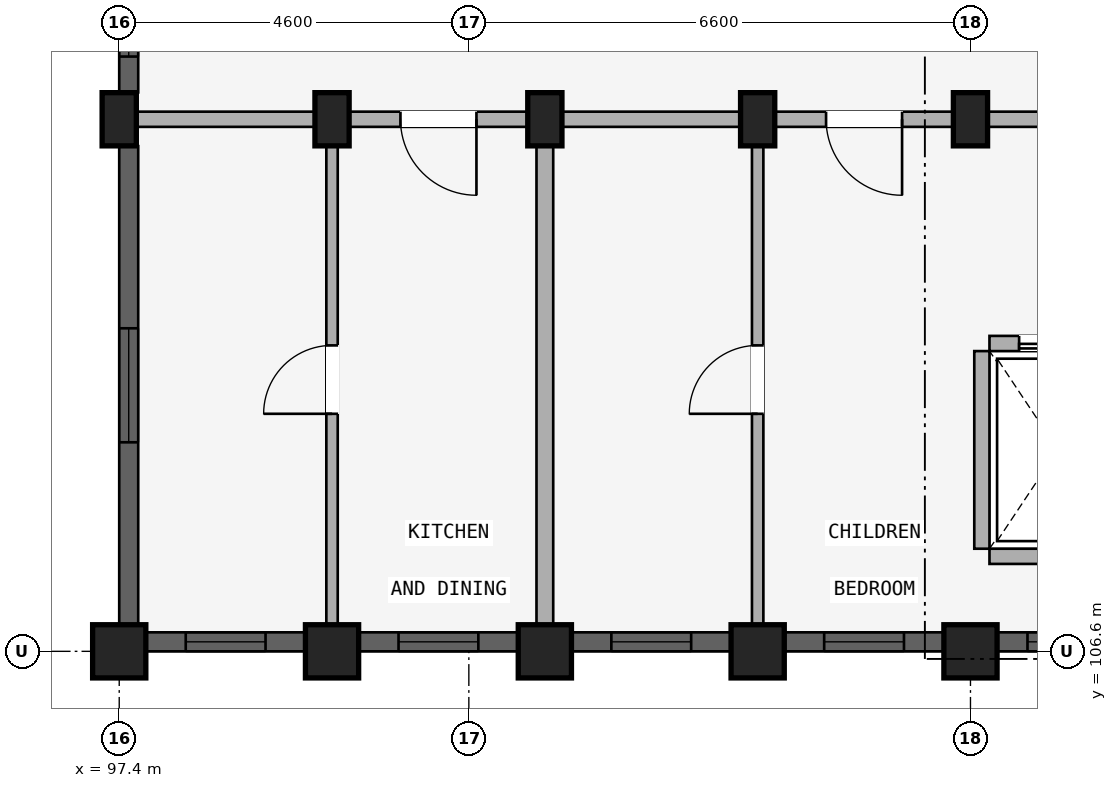
"""IFC4 building model, lengths in metres.
Left out: names, types, materials, properties, quantities, classifications, styles, units other than length and angle.
Written with IfcOpenShell. Run it as: python <this file> out.ifc"""

import sys

from ifc_helpers import new_model, si_unit, direction, frame, frame_2d, origin, origin_2d, place, context, subcontext, project, spatial, rectangle, extrude, element, fill, save


model = new_model("IFC4")
c1 = context("Model", 3, precision=1e-05, world=origin(), true_north=direction((0.0, 1.0)))
c2 = subcontext(c1, "Body", "Model", "MODEL_VIEW")
j1 = project(units=[si_unit("LENGTHUNIT", "METRE"), si_unit("PLANEANGLEUNIT", "RADIAN")], contexts=[c1])
p1 = place(None, origin())
s1 = spatial("IfcSite", under=j1, at=p1, CompositionType="ELEMENT")
p2 = place(p1, origin())
s2 = spatial("IfcBuilding", under=s1, at=p2, CompositionType="ELEMENT")
p3 = place(p2, frame((0.0, 0.0, 21.3)))
s3 = spatial("IfcBuildingStorey", under=s2, at=p3, CompositionType="ELEMENT", Elevation=21.3)
p4 = place(p3, frame((108.6, 106.6, 0.0), z_axis=(0.0, 0.0, 1.0), x_axis=(1.0, 0.0, 0.0)))
e1 = element("IfcColumn", 1, at=p4, inside=s3, PredefinedType="COLUMN", context=c2, shape_type="SweptSolid", body=[
    extrude(rectangle(XDim=0.7, YDim=0.7, at=origin_2d()), origin(), (0.0, 0.0, 1.0), 2.93),
])
p5 = place(p3, frame((108.6, 113.6, 0.0), z_axis=(0.0, 0.0, 1.0), x_axis=(1.0, 0.0, 0.0)))
e2 = element("IfcColumn", 2, at=p5, inside=s3, PredefinedType="COLUMN", context=c2, shape_type="SweptSolid", body=[
    extrude(rectangle(XDim=0.45, YDim=0.7, at=origin_2d()), origin(), (0.0, 0.0, 1.0), 2.93),
])
p6 = place(p3, frame((105.8, 106.6, 0.0), z_axis=(0.0, 0.0, 1.0), x_axis=(1.0, 0.0, 0.0)))
e3 = element("IfcColumn", 3, at=p6, inside=s3, PredefinedType="COLUMN", context=c2, shape_type="SweptSolid", body=[
    extrude(rectangle(XDim=0.7, YDim=0.7, at=origin_2d()), origin(), (0.0, 0.0, 1.0), 2.93),
])
p7 = place(p3, frame((105.8, 113.6, 0.0), z_axis=(0.0, 0.0, 1.0), x_axis=(1.0, 0.0, 0.0)))
e4 = element("IfcColumn", 4, at=p7, inside=s3, PredefinedType="COLUMN", context=c2, shape_type="SweptSolid", body=[
    extrude(rectangle(XDim=0.45, YDim=0.7, at=origin_2d()), origin(), (0.0, 0.0, 1.0), 2.93),
])
p8 = place(p3, frame((103.0, 106.6, 0.0), z_axis=(0.0, 0.0, 1.0), x_axis=(1.0, 0.0, 0.0)))
e5 = element("IfcColumn", 5, at=p8, inside=s3, PredefinedType="COLUMN", context=c2, shape_type="SweptSolid", body=[
    extrude(rectangle(XDim=0.7, YDim=0.7, at=origin_2d()), origin(), (0.0, 0.0, 1.0), 2.93),
])
p9 = place(p3, frame((103.0, 113.6, 0.0), z_axis=(0.0, 0.0, 1.0), x_axis=(1.0, 0.0, 0.0)))
e6 = element("IfcColumn", 6, at=p9, inside=s3, PredefinedType="COLUMN", context=c2, shape_type="SweptSolid", body=[
    extrude(rectangle(XDim=0.45, YDim=0.7, at=origin_2d()), origin(), (0.0, 0.0, 1.0), 2.93),
])
p10 = place(p3, frame((100.2, 106.6, 0.0), z_axis=(0.0, 0.0, 1.0), x_axis=(1.0, 0.0, 0.0)))
e7 = element("IfcColumn", 7, at=p10, inside=s3, PredefinedType="COLUMN", context=c2, shape_type="SweptSolid", body=[
    extrude(rectangle(XDim=0.7, YDim=0.7, at=origin_2d()), origin(), (0.0, 0.0, 1.0), 2.93),
])
p11 = place(p3, frame((100.2, 113.6, 0.0), z_axis=(0.0, 0.0, 1.0), x_axis=(1.0, 0.0, 0.0)))
e8 = element("IfcColumn", 8, at=p11, inside=s3, PredefinedType="COLUMN", context=c2, shape_type="SweptSolid", body=[
    extrude(rectangle(XDim=0.45, YDim=0.7, at=origin_2d()), origin(), (0.0, 0.0, 1.0), 2.93),
])
p12 = place(p3, frame((97.4, 106.6, 0.0), z_axis=(0.0, 0.0, 1.0), x_axis=(1.0, 0.0, 0.0)))
e9 = element("IfcColumn", 9, at=p12, inside=s3, PredefinedType="COLUMN", context=c2, shape_type="SweptSolid", body=[
    extrude(rectangle(XDim=0.7, YDim=0.7, at=origin_2d()), origin(), (0.0, 0.0, 1.0), 2.93),
])
p13 = place(p3, frame((97.4, 113.6, 0.0), z_axis=(0.0, 0.0, 1.0), x_axis=(1.0, 0.0, 0.0)))
e10 = element("IfcColumn", 10, at=p13, inside=s3, PredefinedType="COLUMN", context=c2, shape_type="SweptSolid", body=[
    extrude(rectangle(XDim=0.45, YDim=0.7, at=origin_2d()), origin(), (0.0, 0.0, 1.0), 2.93),
])
p14 = place(p3, frame((108.75, 107.95, 0.0), z_axis=(0.0, 0.0, 1.0), x_axis=(0.0, 1.0, 0.0)))
e11 = element("IfcWall", 11, at=p14, inside=s3, PredefinedType="STANDARD", context=c2, shape_type="SweptSolid", body=[
    extrude(rectangle(XDim=2.6, YDim=0.2, at=frame_2d((1.3, 0.0))), origin(), (0.0, 0.0, 1.0), 2.372),
])
p15 = place(p3, frame((110.65, 107.85, 0.0), z_axis=(0.0, 0.0, 1.0), x_axis=(-1.0, 0.0, 0.0)))
e12 = element("IfcWall", 12, at=p15, inside=s3, PredefinedType="STANDARD", context=c2, shape_type="SweptSolid", body=[
    extrude(rectangle(XDim=1.8, YDim=0.2, at=frame_2d((0.9, 0.0))), origin(), (0.0, 0.0, 1.0), 2.93),
])
p16 = place(p3, frame((110.65, 110.65, 0.0), z_axis=(0.0, 0.0, 1.0), x_axis=(-1.0, 0.0, 0.0)))
e13 = element("IfcWall", 13, at=p16, inside=s3, PredefinedType="STANDARD", context=c2, shape_type="SweptSolid", body=[
    extrude(rectangle(XDim=1.8, YDim=0.2, at=frame_2d((0.9, 0.0))), origin(), (0.0, 0.0, 1.0), 2.93),
])
p17 = place(p16, frame((0.39, 0.0, 0.0)))
e14 = element("IfcOpeningElement", 14, at=p17, cuts=e13, PredefinedType="OPENING", context=c2, shape_type="SweptSolid", body=[
    extrude(rectangle(XDim=1.02, YDim=2.15, at=frame_2d((0.51, 1.075))), frame((0.0, 0.11, 0.0), z_axis=(0.0, -1.0, 0.0), x_axis=(1.0, 0.0, 0.0)), (0.0, 0.0, 1.0), 0.22),
])
p18 = place(p3, frame((114.25, 113.6, 0.0), z_axis=(0.0, 0.0, 1.0), x_axis=(-1.0, 0.0, 0.0)))
e15 = element("IfcWall", 15, at=p18, inside=s3, PredefinedType="STANDARD", context=c2, shape_type="SweptSolid", body=[
    extrude(rectangle(XDim=5.6, YDim=0.2, at=frame_2d((2.8, 0.0))), origin(), (0.0, 0.0, 1.0), 2.372),
])
p19 = place(p18, frame((1.91, 0.0, 0.0)))
e16 = element("IfcOpeningElement", 16, at=p19, cuts=e15, PredefinedType="OPENING", context=c2, shape_type="SweptSolid", body=[
    extrude(rectangle(XDim=1.22, YDim=2.15, at=frame_2d((0.61, 1.075))), frame((0.0, 0.11, 0.0), z_axis=(0.0, -1.0, 0.0), x_axis=(1.0, 0.0, 0.0)), (0.0, 0.0, 1.0), 0.22),
])
p20 = place(p3, frame((108.6, 113.6, 0.0), z_axis=(0.0, 0.0, 1.0), x_axis=(-1.0, 0.0, 0.0)))
e17 = element("IfcWall", 17, at=p20, inside=s3, PredefinedType="STANDARD", context=c2, shape_type="SweptSolid", body=[
    extrude(rectangle(XDim=2.8, YDim=0.2, at=frame_2d((1.4, 0.0))), origin(), (0.0, 0.0, 1.0), 2.372),
])
p21 = place(p20, frame((0.9, 0.0, 0.0)))
e18 = element("IfcOpeningElement", 18, at=p21, cuts=e17, PredefinedType="OPENING", context=c2, shape_type="SweptSolid", body=[
    extrude(rectangle(XDim=1.0, YDim=2.15, at=frame_2d((0.5, 1.075))), frame((0.0, 0.11, 0.0), z_axis=(0.0, -1.0, 0.0), x_axis=(1.0, 0.0, 0.0)), (0.0, 0.0, 1.0), 0.22),
])
p22 = place(p3, frame((105.8, 113.6, 0.0), z_axis=(0.0, 0.0, 1.0), x_axis=(-1.0, 0.0, 0.0)))
e19 = element("IfcWall", 19, at=p22, inside=s3, PredefinedType="STANDARD", context=c2, shape_type="SweptSolid", body=[
    extrude(rectangle(XDim=2.8, YDim=0.2, at=frame_2d((1.4, 0.0))), origin(), (0.0, 0.0, 1.0), 2.372),
])
p23 = place(p3, frame((103.0, 113.6, 0.0), z_axis=(0.0, 0.0, 1.0), x_axis=(-1.0, 0.0, 0.0)))
e20 = element("IfcWall", 20, at=p23, inside=s3, PredefinedType="STANDARD", context=c2, shape_type="SweptSolid", body=[
    extrude(rectangle(XDim=2.8, YDim=0.2, at=frame_2d((1.4, 0.0))), origin(), (0.0, 0.0, 1.0), 2.372),
])
p24 = place(p23, frame((0.9, 0.0, 0.0)))
e21 = element("IfcOpeningElement", 21, at=p24, cuts=e20, PredefinedType="OPENING", context=c2, shape_type="SweptSolid", body=[
    extrude(rectangle(XDim=1.0, YDim=2.15, at=frame_2d((0.5, 1.075))), frame((0.0, 0.11, 0.0), z_axis=(0.0, -1.0, 0.0), x_axis=(1.0, 0.0, 0.0)), (0.0, 0.0, 1.0), 0.22),
])
p25 = place(p3, frame((100.2, 113.6, 0.0), z_axis=(0.0, 0.0, 1.0), x_axis=(-1.0, 0.0, 0.0)))
e22 = element("IfcWall", 22, at=p25, inside=s3, PredefinedType="STANDARD", context=c2, shape_type="SweptSolid", body=[
    extrude(rectangle(XDim=2.8, YDim=0.2, at=frame_2d((1.4, 0.0))), origin(), (0.0, 0.0, 1.0), 2.372),
])
p26 = place(p3, frame((105.8, 106.8, 0.0), z_axis=(0.0, 0.0, 1.0), x_axis=(0.0, 1.0, 0.0)))
e23 = element("IfcWall", 23, at=p26, inside=s3, PredefinedType="PARTITIONING", context=c2, shape_type="SweptSolid", body=[
    extrude(rectangle(XDim=6.75, YDim=0.15, at=frame_2d((3.375, 0.0))), origin(), (0.0, 0.0, 1.0), 2.372),
])
p27 = place(p26, frame((2.925, 0.0, 0.0)))
e24 = element("IfcOpeningElement", 24, at=p27, cuts=e23, PredefinedType="OPENING", context=c2, shape_type="SweptSolid", body=[
    extrude(rectangle(XDim=0.9, YDim=2.1, at=frame_2d((0.45, 1.05))), frame((0.0, 0.085, 0.0), z_axis=(0.0, -1.0, 0.0), x_axis=(1.0, 0.0, 0.0)), (0.0, 0.0, 1.0), 0.17),
])
p28 = place(p3, frame((103.0, 106.8, 0.0), z_axis=(0.0, 0.0, 1.0), x_axis=(0.0, 1.0, 0.0)))
e25 = element("IfcWall", 25, at=p28, inside=s3, PredefinedType="STANDARD", context=c2, shape_type="SweptSolid", body=[
    extrude(rectangle(XDim=6.75, YDim=0.22, at=frame_2d((3.375, 0.0))), origin(), (0.0, 0.0, 1.0), 2.372),
])
p29 = place(p3, frame((100.2, 106.8, 0.0), z_axis=(0.0, 0.0, 1.0), x_axis=(0.0, 1.0, 0.0)))
e26 = element("IfcWall", 26, at=p29, inside=s3, PredefinedType="PARTITIONING", context=c2, shape_type="SweptSolid", body=[
    extrude(rectangle(XDim=6.75, YDim=0.15, at=frame_2d((3.375, 0.0))), origin(), (0.0, 0.0, 1.0), 2.372),
])
p30 = place(p29, frame((2.925, 0.0, 0.0)))
e27 = element("IfcOpeningElement", 27, at=p30, cuts=e26, PredefinedType="OPENING", context=c2, shape_type="SweptSolid", body=[
    extrude(rectangle(XDim=0.9, YDim=2.1, at=frame_2d((0.45, 1.05))), frame((0.0, 0.085, 0.0), z_axis=(0.0, -1.0, 0.0), x_axis=(1.0, 0.0, 0.0)), (0.0, 0.0, 1.0), 0.17),
])
p31 = place(p3, frame((111.372, 106.725, 0.0), z_axis=(0.0, 0.0, 1.0), x_axis=(-1.0, 0.0, 0.0)))
e28 = element("IfcWall", 28, at=p31, inside=s3, PredefinedType="STANDARD", context=c2, shape_type="SweptSolid", body=[
    extrude(rectangle(XDim=2.422, YDim=0.25, at=frame_2d((1.211, 0.0))), origin(), (0.0, 0.0, 1.0), 2.472),
])
p32 = place(p31, frame((0.822, 0.0, 0.772)))
e29 = element("IfcOpeningElement", 29, at=p32, cuts=e28, PredefinedType="OPENING", context=c2, shape_type="SweptSolid", body=[
    extrude(rectangle(XDim=1.2, YDim=1.5, at=frame_2d((0.6, 0.75))), frame((0.0, 0.135, 0.0), z_axis=(0.0, -1.0, 0.0), x_axis=(1.0, 0.0, 0.0)), (0.0, 0.0, 1.0), 0.27),
])
p33 = place(p3, frame((108.247, 106.725, 0.0), z_axis=(0.0, 0.0, 1.0), x_axis=(-1.0, 0.0, 0.0)))
e30 = element("IfcWall", 30, at=p33, inside=s3, PredefinedType="STANDARD", context=c2, shape_type="SweptSolid", body=[
    extrude(rectangle(XDim=2.093, YDim=0.25, at=frame_2d((1.046, 0.0))), origin(), (0.0, 0.0, 1.0), 2.472),
])
p34 = place(p33, frame((0.521, 0.0, 0.88)))
e31 = element("IfcOpeningElement", 31, at=p34, cuts=e30, PredefinedType="OPENING", context=c2, shape_type="SweptSolid", body=[
    extrude(rectangle(XDim=1.05, YDim=1.25, at=frame_2d((0.525, 0.625))), frame((0.0, 0.135, 0.0), z_axis=(0.0, -1.0, 0.0), x_axis=(1.0, 0.0, 0.0)), (0.0, 0.0, 1.0), 0.27),
])
p35 = place(p3, frame((105.447, 106.725, 0.0), z_axis=(0.0, 0.0, 1.0), x_axis=(-1.0, 0.0, 0.0)))
e32 = element("IfcWall", 32, at=p35, inside=s3, PredefinedType="STANDARD", context=c2, shape_type="SweptSolid", body=[
    extrude(rectangle(XDim=2.093, YDim=0.25, at=frame_2d((1.046, 0.0))), origin(), (0.0, 0.0, 1.0), 2.472),
])
p36 = place(p35, frame((0.521, 0.0, 0.88)))
e33 = element("IfcOpeningElement", 33, at=p36, cuts=e32, PredefinedType="OPENING", context=c2, shape_type="SweptSolid", body=[
    extrude(rectangle(XDim=1.05, YDim=1.25, at=frame_2d((0.525, 0.625))), frame((0.0, 0.135, 0.0), z_axis=(0.0, -1.0, 0.0), x_axis=(1.0, 0.0, 0.0)), (0.0, 0.0, 1.0), 0.27),
])
p37 = place(p3, frame((102.646, 106.725, 0.0), z_axis=(0.0, 0.0, 1.0), x_axis=(-1.0, 0.0, 0.0)))
e34 = element("IfcWall", 34, at=p37, inside=s3, PredefinedType="STANDARD", context=c2, shape_type="SweptSolid", body=[
    extrude(rectangle(XDim=2.093, YDim=0.25, at=frame_2d((1.046, 0.0))), origin(), (0.0, 0.0, 1.0), 2.472),
])
p38 = place(p37, frame((0.521, 0.0, 0.88)))
e35 = element("IfcOpeningElement", 35, at=p38, cuts=e34, PredefinedType="OPENING", context=c2, shape_type="SweptSolid", body=[
    extrude(rectangle(XDim=1.05, YDim=1.25, at=frame_2d((0.525, 0.625))), frame((0.0, 0.135, 0.0), z_axis=(0.0, -1.0, 0.0), x_axis=(1.0, 0.0, 0.0)), (0.0, 0.0, 1.0), 0.27),
])
p39 = place(p3, frame((99.846, 106.725, 0.0), z_axis=(0.0, 0.0, 1.0), x_axis=(-1.0, 0.0, 0.0)))
e36 = element("IfcWall", 36, at=p39, inside=s3, PredefinedType="STANDARD", context=c2, shape_type="SweptSolid", body=[
    extrude(rectangle(XDim=2.093, YDim=0.25, at=frame_2d((1.046, 0.0))), origin(), (0.0, 0.0, 1.0), 2.472),
])
p40 = place(p39, frame((0.521, 0.0, 0.88)))
e37 = element("IfcOpeningElement", 37, at=p40, cuts=e36, PredefinedType="OPENING", context=c2, shape_type="SweptSolid", body=[
    extrude(rectangle(XDim=1.05, YDim=1.25, at=frame_2d((0.525, 0.625))), frame((0.0, 0.135, 0.0), z_axis=(0.0, -1.0, 0.0), x_axis=(1.0, 0.0, 0.0)), (0.0, 0.0, 1.0), 0.27),
])
p41 = place(p3, frame((97.525, 106.954, 0.0), z_axis=(0.0, 0.0, 1.0), x_axis=(0.0, 1.0, 0.0)))
e38 = element("IfcWall", 38, at=p41, inside=s3, PredefinedType="STANDARD", context=c2, shape_type="SweptSolid", body=[
    extrude(rectangle(XDim=6.293, YDim=0.25, at=frame_2d((3.146, 0.0))), origin(), (0.0, 0.0, 1.0), 2.372),
])
p42 = place(p41, frame((2.396, 0.0, 0.522)))
e39 = element("IfcOpeningElement", 39, at=p42, cuts=e38, PredefinedType="OPENING", context=c2, shape_type="SweptSolid", body=[
    extrude(rectangle(XDim=1.5, YDim=1.65, at=frame_2d((0.75, 0.825))), frame((0.0, 0.135, 0.0), z_axis=(0.0, -1.0, 0.0), x_axis=(1.0, 0.0, 0.0)), (0.0, 0.0, 1.0), 0.27),
])
p43 = place(p3, frame((97.525, 113.954, 0.0), z_axis=(0.0, 0.0, 1.0), x_axis=(0.0, 1.0, 0.0)))
e40 = element("IfcWall", 40, at=p43, inside=s3, PredefinedType="STANDARD", context=c2, shape_type="SweptSolid", body=[
    extrude(rectangle(XDim=1.693, YDim=0.25, at=frame_2d((0.846, 0.0))), origin(), (0.0, 0.0, 1.0), 2.372),
])
p44 = place(p43, frame((0.471, 0.0, 0.88)))
e41 = element("IfcOpeningElement", 41, at=p44, cuts=e40, PredefinedType="OPENING", context=c2, shape_type="SweptSolid", body=[
    extrude(rectangle(XDim=0.75, YDim=1.05, at=frame_2d((0.375, 0.525))), frame((0.0, 0.135, 0.0), z_axis=(0.0, -1.0, 0.0), x_axis=(1.0, 0.0, 0.0)), (0.0, 0.0, 1.0), 0.27),
])
p45 = place(p32, origin())
e42 = element("IfcWindow", 42, at=p45, inside=s3, PartitioningType="SINGLE_PANEL", PredefinedType="WINDOW", context=c2, shape_type="SweptSolid", body=[
    extrude(rectangle(XDim=1.2, YDim=1.5, at=frame_2d((0.6, 0.75))), frame((0.0, 0.03, 0.0), z_axis=(0.0, -1.0, 0.0), x_axis=(1.0, 0.0, 0.0)), (0.0, 0.0, 1.0), 0.06),
])
fill(e29, e42)
p46 = place(p34, origin())
e43 = element("IfcWindow", 43, at=p46, inside=s3, PartitioningType="SINGLE_PANEL", PredefinedType="WINDOW", context=c2, shape_type="SweptSolid", body=[
    extrude(rectangle(XDim=1.05, YDim=1.25, at=frame_2d((0.525, 0.625))), frame((0.0, 0.03, 0.0), z_axis=(0.0, -1.0, 0.0), x_axis=(1.0, 0.0, 0.0)), (0.0, 0.0, 1.0), 0.06),
])
fill(e31, e43)
p47 = place(p36, origin())
e44 = element("IfcWindow", 44, at=p47, inside=s3, PartitioningType="SINGLE_PANEL", PredefinedType="WINDOW", context=c2, shape_type="SweptSolid", body=[
    extrude(rectangle(XDim=1.05, YDim=1.25, at=frame_2d((0.525, 0.625))), frame((0.0, 0.03, 0.0), z_axis=(0.0, -1.0, 0.0), x_axis=(1.0, 0.0, 0.0)), (0.0, 0.0, 1.0), 0.06),
])
fill(e33, e44)
p48 = place(p38, origin())
e45 = element("IfcWindow", 45, at=p48, inside=s3, PartitioningType="SINGLE_PANEL", PredefinedType="WINDOW", context=c2, shape_type="SweptSolid", body=[
    extrude(rectangle(XDim=1.05, YDim=1.25, at=frame_2d((0.525, 0.625))), frame((0.0, 0.03, 0.0), z_axis=(0.0, -1.0, 0.0), x_axis=(1.0, 0.0, 0.0)), (0.0, 0.0, 1.0), 0.06),
])
fill(e35, e45)
p49 = place(p40, origin())
e46 = element("IfcWindow", 46, at=p49, inside=s3, PartitioningType="SINGLE_PANEL", PredefinedType="WINDOW", context=c2, shape_type="SweptSolid", body=[
    extrude(rectangle(XDim=1.05, YDim=1.25, at=frame_2d((0.525, 0.625))), frame((0.0, 0.03, 0.0), z_axis=(0.0, -1.0, 0.0), x_axis=(1.0, 0.0, 0.0)), (0.0, 0.0, 1.0), 0.06),
])
fill(e37, e46)
p50 = place(p42, origin())
e47 = element("IfcWindow", 47, at=p50, inside=s3, PartitioningType="DOUBLE_PANEL_VERTICAL", PredefinedType="WINDOW", context=c2, shape_type="SweptSolid", body=[
    extrude(rectangle(XDim=1.5, YDim=1.65, at=frame_2d((0.75, 0.825))), frame((0.0, 0.03, 0.0), z_axis=(0.0, -1.0, 0.0), x_axis=(1.0, 0.0, 0.0)), (0.0, 0.0, 1.0), 0.06),
])
fill(e39, e47)
p51 = place(p44, origin())
e48 = element("IfcWindow", 48, at=p51, inside=s3, PartitioningType="SINGLE_PANEL", PredefinedType="WINDOW", context=c2, shape_type="SweptSolid", body=[
    extrude(rectangle(XDim=0.75, YDim=1.05, at=frame_2d((0.375, 0.525))), frame((0.0, 0.03, 0.0), z_axis=(0.0, -1.0, 0.0), x_axis=(1.0, 0.0, 0.0)), (0.0, 0.0, 1.0), 0.06),
])
fill(e41, e48)
p52 = place(p17, origin())
e49 = element("IfcDoor", 49, at=p52, inside=s3, OperationType="SLIDING_TO_RIGHT", PredefinedType="DOOR", context=c2, shape_type="SweptSolid", body=[
    extrude(rectangle(XDim=1.02, YDim=2.15, at=frame_2d((0.51, 1.075))), frame((0.0, 0.025, 0.0), z_axis=(0.0, -1.0, 0.0), x_axis=(1.0, 0.0, 0.0)), (0.0, 0.0, 1.0), 0.05),
])
fill(e14, e49)
p53 = place(p21, frame((1.0, 0.0, 0.0), z_axis=(0.0, 0.0, 1.0), x_axis=(-1.0, 0.0, 0.0)))
e50 = element("IfcDoor", 50, at=p53, inside=s3, OperationType="SINGLE_SWING_RIGHT", PredefinedType="DOOR", context=c2, shape_type="SweptSolid", body=[
    extrude(rectangle(XDim=1.0, YDim=2.15, at=frame_2d((0.5, 1.075))), frame((0.0, 0.025, 0.0), z_axis=(0.0, -1.0, 0.0), x_axis=(1.0, 0.0, 0.0)), (0.0, 0.0, 1.0), 0.05),
])
fill(e18, e50)
p54 = place(p24, frame((1.0, 0.0, 0.0), z_axis=(0.0, 0.0, 1.0), x_axis=(-1.0, 0.0, 0.0)))
e51 = element("IfcDoor", 51, at=p54, inside=s3, OperationType="SINGLE_SWING_RIGHT", PredefinedType="DOOR", context=c2, shape_type="SweptSolid", body=[
    extrude(rectangle(XDim=1.0, YDim=2.15, at=frame_2d((0.5, 1.075))), frame((0.0, 0.025, 0.0), z_axis=(0.0, -1.0, 0.0), x_axis=(1.0, 0.0, 0.0)), (0.0, 0.0, 1.0), 0.05),
])
fill(e21, e51)
p55 = place(p27, origin())
e52 = element("IfcDoor", 52, at=p55, inside=s3, OperationType="SINGLE_SWING_LEFT", PredefinedType="DOOR", context=c2, shape_type="SweptSolid", body=[
    extrude(rectangle(XDim=0.9, YDim=2.1, at=frame_2d((0.45, 1.05))), frame((0.0, 0.025, 0.0), z_axis=(0.0, -1.0, 0.0), x_axis=(1.0, 0.0, 0.0)), (0.0, 0.0, 1.0), 0.05),
])
fill(e24, e52)
p56 = place(p30, frame((0.9, 0.0, 0.0), z_axis=(0.0, 0.0, 1.0), x_axis=(-1.0, 0.0, 0.0)))
e53 = element("IfcDoor", 53, at=p56, inside=s3, OperationType="SINGLE_SWING_RIGHT", PredefinedType="DOOR", context=c2, shape_type="SweptSolid", body=[
    extrude(rectangle(XDim=0.9, YDim=2.1, at=frame_2d((0.45, 1.05))), frame((0.0, 0.025, 0.0), z_axis=(0.0, -1.0, 0.0), x_axis=(1.0, 0.0, 0.0)), (0.0, 0.0, 1.0), 0.05),
])
fill(e27, e53)
save(model, sys.argv[1])
